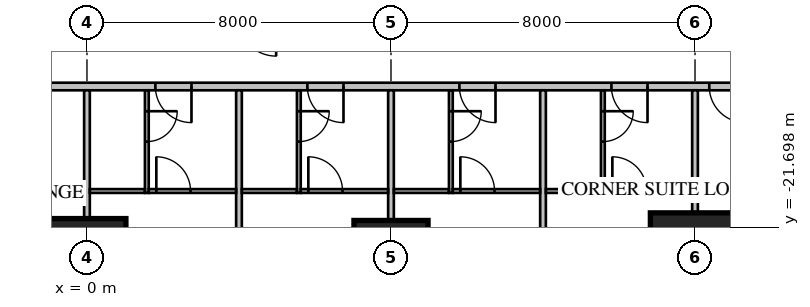
"""IFC4 building model, lengths in metres.
Left out: names, types, materials, properties, quantities, classifications, styles, units other than length and angle.
Written with IfcOpenShell. Run it as: python <this file> out.ifc"""

import sys

from ifc_helpers import new_model, si_unit, direction, frame, frame_2d, origin, origin_2d, place, context, subcontext, project, spatial, rectangle, extrude, element, fill, save


model = new_model("IFC4")
c1 = context("Model", 3, precision=1e-05, world=origin(), true_north=direction((0.0, 1.0)))
c2 = subcontext(c1, "Body", "Model", "MODEL_VIEW")
j1 = project(units=[si_unit("LENGTHUNIT", "METRE"), si_unit("PLANEANGLEUNIT", "RADIAN")], contexts=[c1])
p1 = place(None, origin())
s1 = spatial("IfcSite", under=j1, at=p1, CompositionType="ELEMENT")
p2 = place(p1, origin())
s2 = spatial("IfcBuilding", under=s1, at=p2, CompositionType="ELEMENT")
p3 = place(p2, frame((0.0, 0.0, 23.7)))
s3 = spatial("IfcBuildingStorey", under=s2, at=p3, CompositionType="ELEMENT", Elevation=23.7)
p4 = place(p3, frame((0.0, -22.5, 0.0), z_axis=(0.0, 0.0, 1.0), x_axis=(1.0, 0.0, 0.0)))
e1 = element("IfcColumn", 1, at=p4, inside=s3, PredefinedType="COLUMN", context=c2, shape_type="SweptSolid", body=[
    extrude(rectangle(XDim=2.05, YDim=2.05, at=origin_2d()), origin(), (0.0, 0.0, 1.0), 3.85),
])
p5 = place(p3, frame((8.0, -22.5, 0.0), z_axis=(0.0, 0.0, 1.0), x_axis=(1.0, 0.0, 0.0)))
e2 = element("IfcColumn", 2, at=p5, inside=s3, PredefinedType="COLUMN", context=c2, shape_type="SweptSolid", body=[
    extrude(rectangle(XDim=1.95, YDim=1.95, at=origin_2d()), origin(), (0.0, 0.0, 1.0), 3.85),
])
p6 = place(p3, frame((16.0, -22.5, 0.0), z_axis=(0.0, 0.0, 1.0), x_axis=(1.0, 0.0, 0.0)))
e3 = element("IfcColumn", 3, at=p6, inside=s3, PredefinedType="COLUMN", context=c2, shape_type="SweptSolid", body=[
    extrude(rectangle(XDim=2.35, YDim=2.35, at=origin_2d()), origin(), (0.0, 0.0, 1.0), 3.85),
])
p7 = place(p3, frame((-18.0, -18.0, 0.0), z_axis=(0.0, 0.0, 1.0), x_axis=(1.0, 0.0, 0.0)))
e4 = element("IfcWall", 4, at=p7, inside=s3, PredefinedType="PARTITIONING", context=c2, shape_type="SweptSolid", body=[
    extrude(rectangle(XDim=36.0, YDim=0.2, at=frame_2d((18.0, 0.0))), origin(), (0.0, 0.0, 1.0), 3.65),
])
p8 = place(p7, frame((0.375, 0.0, 0.0)))
e5 = element("IfcOpeningElement", 5, at=p8, cuts=e4, PredefinedType="OPENING", context=c2, shape_type="SweptSolid", body=[
    extrude(rectangle(XDim=1.0, YDim=2.1, at=frame_2d((0.5, 1.05))), frame((0.0, 0.12, 0.0), z_axis=(0.0, -1.0, 0.0), x_axis=(1.0, 0.0, 0.0)), (0.0, 0.0, 1.0), 0.24),
])
p9 = place(p7, frame((2.45, 0.0, 0.0)))
e6 = element("IfcOpeningElement", 6, at=p9, cuts=e4, PredefinedType="OPENING", context=c2, shape_type="SweptSolid", body=[
    extrude(rectangle(XDim=0.8, YDim=2.1, at=frame_2d((0.4, 1.05))), frame((0.0, 0.12, 0.0), z_axis=(0.0, -1.0, 0.0), x_axis=(1.0, 0.0, 0.0)), (0.0, 0.0, 1.0), 0.24),
])
p10 = place(p7, frame((4.05, 0.0, 0.0)))
e7 = element("IfcOpeningElement", 7, at=p10, cuts=e4, PredefinedType="OPENING", context=c2, shape_type="SweptSolid", body=[
    extrude(rectangle(XDim=1.0, YDim=2.1, at=frame_2d((0.5, 1.05))), frame((0.0, 0.12, 0.0), z_axis=(0.0, -1.0, 0.0), x_axis=(1.0, 0.0, 0.0)), (0.0, 0.0, 1.0), 0.24),
])
p11 = place(p7, frame((6.45, 0.0, 0.0)))
e8 = element("IfcOpeningElement", 8, at=p11, cuts=e4, PredefinedType="OPENING", context=c2, shape_type="SweptSolid", body=[
    extrude(rectangle(XDim=0.9, YDim=2.1, at=frame_2d((0.45, 1.05))), frame((0.0, 0.12, 0.0), z_axis=(0.0, -1.0, 0.0), x_axis=(1.0, 0.0, 0.0)), (0.0, 0.0, 1.0), 0.24),
])
p12 = place(p7, frame((8.15, 0.0, 0.0)))
e9 = element("IfcOpeningElement", 9, at=p12, cuts=e4, PredefinedType="OPENING", context=c2, shape_type="SweptSolid", body=[
    extrude(rectangle(XDim=1.0, YDim=2.1, at=frame_2d((0.5, 1.05))), frame((0.0, 0.12, 0.0), z_axis=(0.0, -1.0, 0.0), x_axis=(1.0, 0.0, 0.0)), (0.0, 0.0, 1.0), 0.24),
])
p13 = place(p7, frame((19.8, 0.0, 0.0)))
e10 = element("IfcOpeningElement", 10, at=p13, cuts=e4, PredefinedType="OPENING", context=c2, shape_type="SweptSolid", body=[
    extrude(rectangle(XDim=0.95, YDim=2.1, at=frame_2d((0.475, 1.05))), frame((0.0, 0.12, 0.0), z_axis=(0.0, -1.0, 0.0), x_axis=(1.0, 0.0, 0.0)), (0.0, 0.0, 1.0), 0.24),
])
p14 = place(p7, frame((23.8, 0.0, 0.0)))
e11 = element("IfcOpeningElement", 11, at=p14, cuts=e4, PredefinedType="OPENING", context=c2, shape_type="SweptSolid", body=[
    extrude(rectangle(XDim=0.95, YDim=2.1, at=frame_2d((0.475, 1.05))), frame((0.0, 0.12, 0.0), z_axis=(0.0, -1.0, 0.0), x_axis=(1.0, 0.0, 0.0)), (0.0, 0.0, 1.0), 0.24),
])
p15 = place(p7, frame((27.8, 0.0, 0.0)))
e12 = element("IfcOpeningElement", 12, at=p15, cuts=e4, PredefinedType="OPENING", context=c2, shape_type="SweptSolid", body=[
    extrude(rectangle(XDim=0.95, YDim=2.1, at=frame_2d((0.475, 1.05))), frame((0.0, 0.12, 0.0), z_axis=(0.0, -1.0, 0.0), x_axis=(1.0, 0.0, 0.0)), (0.0, 0.0, 1.0), 0.24),
])
p16 = place(p7, frame((31.8, 0.0, 0.0)))
e13 = element("IfcOpeningElement", 13, at=p16, cuts=e4, PredefinedType="OPENING", context=c2, shape_type="SweptSolid", body=[
    extrude(rectangle(XDim=0.95, YDim=2.1, at=frame_2d((0.475, 1.05))), frame((0.0, 0.12, 0.0), z_axis=(0.0, -1.0, 0.0), x_axis=(1.0, 0.0, 0.0)), (0.0, 0.0, 1.0), 0.24),
])
p17 = place(p7, frame((34.375, 0.0, 0.0)))
e14 = element("IfcOpeningElement", 14, at=p17, cuts=e4, PredefinedType="OPENING", context=c2, shape_type="SweptSolid", body=[
    extrude(rectangle(XDim=0.95, YDim=2.1, at=frame_2d((0.475, 1.05))), frame((0.0, 0.12, 0.0), z_axis=(0.0, -1.0, 0.0), x_axis=(1.0, 0.0, 0.0)), (0.0, 0.0, 1.0), 0.24),
])
p18 = place(p7, frame((11.2, 0.0, 0.0)))
e15 = element("IfcOpeningElement", 15, at=p18, cuts=e4, PredefinedType="OPENING", context=c2, shape_type="SweptSolid", body=[
    extrude(rectangle(XDim=1.0, YDim=2.1, at=frame_2d((0.5, 1.05))), frame((0.0, 0.12, 0.0), z_axis=(0.0, -1.0, 0.0), x_axis=(1.0, 0.0, 0.0)), (0.0, 0.0, 1.0), 0.24),
])
p19 = place(p3, frame((0.0, -18.1, 0.0), z_axis=(0.0, 0.0, 1.0), x_axis=(0.0, -1.0, 0.0)))
e16 = element("IfcWall", 16, at=p19, inside=s3, PredefinedType="PARTITIONING", context=c2, shape_type="SweptSolid", body=[
    extrude(rectangle(XDim=6.6, YDim=0.15, at=frame_2d((3.3, 0.0))), origin(), (0.0, 0.0, 1.0), 2.809),
])
for number, where, z_axis, x_axis in (
    (17, (4.0, -18.1, 0.0), (0.0, 0.0, 1.0), (0.0, -1.0, 0.0)),
    (18, (8.0, -18.1, 0.0), (0.0, 0.0, 1.0), (0.0, -1.0, 0.0)),
    (19, (12.0, -18.1, 0.0), (0.0, 0.0, 1.0), (0.0, -1.0, 0.0)),
):
    element("IfcWall", number, at=place(p3, frame(where, z_axis=z_axis, x_axis=x_axis)), inside=s3, PredefinedType="PARTITIONING", context=c2, shape_type="SweptSolid", body=[
        extrude(rectangle(XDim=6.6, YDim=0.15, at=frame_2d((3.3, 0.0))), origin(), (0.0, 0.0, 1.0), 3.65),
    ])
p20 = place(p3, frame((16.0, -18.1, 0.0), z_axis=(0.0, 0.0, 1.0), x_axis=(0.0, -1.0, 0.0)))
e20 = element("IfcWall", 20, at=p20, inside=s3, PredefinedType="PARTITIONING", context=c2, shape_type="SweptSolid", body=[
    extrude(rectangle(XDim=6.589, YDim=0.15, at=frame_2d((3.295, 0.0))), origin(), (0.0, 0.0, 1.0), 3.65),
])
p21 = place(p3, frame((1.575, -18.1, 0.0), z_axis=(0.0, 0.0, 1.0), x_axis=(0.0, -1.0, 0.0)))
e21 = element("IfcWall", 21, at=p21, inside=s3, PredefinedType="PARTITIONING", context=c2, shape_type="SweptSolid", body=[
    extrude(rectangle(XDim=2.7, YDim=0.1, at=frame_2d((1.35, 0.0))), origin(), (0.0, 0.0, 1.0), 3.65),
])
p22 = place(p21, frame((0.55, 0.0, 0.0)))
e22 = element("IfcOpeningElement", 22, at=p22, cuts=e21, PredefinedType="OPENING", context=c2, shape_type="SweptSolid", body=[
    extrude(rectangle(XDim=0.8, YDim=2.1, at=frame_2d((0.4, 1.05))), frame((0.0, 0.07, 0.0), z_axis=(0.0, -1.0, 0.0), x_axis=(1.0, 0.0, 0.0)), (0.0, 0.0, 1.0), 0.14),
])
p23 = place(p3, frame((0.075, -20.75, 0.0), z_axis=(0.0, 0.0, 1.0), x_axis=(1.0, 0.0, 0.0)))
e23 = element("IfcWall", 23, at=p23, inside=s3, PredefinedType="PARTITIONING", context=c2, shape_type="SweptSolid", body=[
    extrude(rectangle(XDim=1.45, YDim=0.1, at=frame_2d((0.725, 0.0))), origin(), (0.0, 0.0, 1.0), 3.65),
])
p24 = place(p3, frame((5.575, -18.1, 0.0), z_axis=(0.0, 0.0, 1.0), x_axis=(0.0, -1.0, 0.0)))
e24 = element("IfcWall", 24, at=p24, inside=s3, PredefinedType="PARTITIONING", context=c2, shape_type="SweptSolid", body=[
    extrude(rectangle(XDim=2.7, YDim=0.1, at=frame_2d((1.35, 0.0))), origin(), (0.0, 0.0, 1.0), 3.65),
])
p25 = place(p24, frame((0.55, 0.0, 0.0)))
e25 = element("IfcOpeningElement", 25, at=p25, cuts=e24, PredefinedType="OPENING", context=c2, shape_type="SweptSolid", body=[
    extrude(rectangle(XDim=0.8, YDim=2.1, at=frame_2d((0.4, 1.05))), frame((0.0, 0.07, 0.0), z_axis=(0.0, -1.0, 0.0), x_axis=(1.0, 0.0, 0.0)), (0.0, 0.0, 1.0), 0.14),
])
p26 = place(p3, frame((4.075, -20.75, 0.0), z_axis=(0.0, 0.0, 1.0), x_axis=(1.0, 0.0, 0.0)))
e26 = element("IfcWall", 26, at=p26, inside=s3, PredefinedType="PARTITIONING", context=c2, shape_type="SweptSolid", body=[
    extrude(rectangle(XDim=1.45, YDim=0.1, at=frame_2d((0.725, 0.0))), origin(), (0.0, 0.0, 1.0), 3.65),
])
p27 = place(p3, frame((9.575, -18.1, 0.0), z_axis=(0.0, 0.0, 1.0), x_axis=(0.0, -1.0, 0.0)))
e27 = element("IfcWall", 27, at=p27, inside=s3, PredefinedType="PARTITIONING", context=c2, shape_type="SweptSolid", body=[
    extrude(rectangle(XDim=2.7, YDim=0.1, at=frame_2d((1.35, 0.0))), origin(), (0.0, 0.0, 1.0), 3.65),
])
p28 = place(p27, frame((0.55, 0.0, 0.0)))
e28 = element("IfcOpeningElement", 28, at=p28, cuts=e27, PredefinedType="OPENING", context=c2, shape_type="SweptSolid", body=[
    extrude(rectangle(XDim=0.8, YDim=2.1, at=frame_2d((0.4, 1.05))), frame((0.0, 0.07, 0.0), z_axis=(0.0, -1.0, 0.0), x_axis=(1.0, 0.0, 0.0)), (0.0, 0.0, 1.0), 0.14),
])
p29 = place(p3, frame((8.075, -20.75, 0.0), z_axis=(0.0, 0.0, 1.0), x_axis=(1.0, 0.0, 0.0)))
e29 = element("IfcWall", 29, at=p29, inside=s3, PredefinedType="PARTITIONING", context=c2, shape_type="SweptSolid", body=[
    extrude(rectangle(XDim=1.45, YDim=0.1, at=frame_2d((0.725, 0.0))), origin(), (0.0, 0.0, 1.0), 3.65),
])
p30 = place(p3, frame((13.575, -18.1, 0.0), z_axis=(0.0, 0.0, 1.0), x_axis=(0.0, -1.0, 0.0)))
e30 = element("IfcWall", 30, at=p30, inside=s3, PredefinedType="PARTITIONING", context=c2, shape_type="SweptSolid", body=[
    extrude(rectangle(XDim=2.7, YDim=0.1, at=frame_2d((1.35, 0.0))), origin(), (0.0, 0.0, 1.0), 3.65),
])
p31 = place(p30, frame((0.55, 0.0, 0.0)))
e31 = element("IfcOpeningElement", 31, at=p31, cuts=e30, PredefinedType="OPENING", context=c2, shape_type="SweptSolid", body=[
    extrude(rectangle(XDim=0.8, YDim=2.1, at=frame_2d((0.4, 1.05))), frame((0.0, 0.07, 0.0), z_axis=(0.0, -1.0, 0.0), x_axis=(1.0, 0.0, 0.0)), (0.0, 0.0, 1.0), 0.14),
])
p32 = place(p3, frame((12.075, -20.75, 0.0), z_axis=(0.0, 0.0, 1.0), x_axis=(1.0, 0.0, 0.0)))
e32 = element("IfcWall", 32, at=p32, inside=s3, PredefinedType="PARTITIONING", context=c2, shape_type="SweptSolid", body=[
    extrude(rectangle(XDim=1.45, YDim=0.1, at=frame_2d((0.725, 0.0))), origin(), (0.0, 0.0, 1.0), 3.65),
])
p33 = place(p3, frame((1.625, -20.75, 0.0), z_axis=(0.0, 0.0, 1.0), x_axis=(1.0, 0.0, 0.0)))
e33 = element("IfcWall", 33, at=p33, inside=s3, PredefinedType="PARTITIONING", context=c2, shape_type="SweptSolid", body=[
    extrude(rectangle(XDim=2.3, YDim=0.1, at=frame_2d((1.15, 0.0))), origin(), (0.0, 0.0, 1.0), 3.65),
])
p34 = place(p33, frame((0.2, 0.0, 0.0)))
e34 = element("IfcOpeningElement", 34, at=p34, cuts=e33, PredefinedType="OPENING", context=c2, shape_type="SweptSolid", body=[
    extrude(rectangle(XDim=0.9, YDim=2.1, at=frame_2d((0.45, 1.05))), frame((0.0, 0.07, 0.0), z_axis=(0.0, -1.0, 0.0), x_axis=(1.0, 0.0, 0.0)), (0.0, 0.0, 1.0), 0.14),
])
p35 = place(p3, frame((5.625, -20.75, 0.0), z_axis=(0.0, 0.0, 1.0), x_axis=(1.0, 0.0, 0.0)))
e35 = element("IfcWall", 35, at=p35, inside=s3, PredefinedType="PARTITIONING", context=c2, shape_type="SweptSolid", body=[
    extrude(rectangle(XDim=2.3, YDim=0.1, at=frame_2d((1.15, 0.0))), origin(), (0.0, 0.0, 1.0), 3.65),
])
p36 = place(p35, frame((0.2, 0.0, 0.0)))
e36 = element("IfcOpeningElement", 36, at=p36, cuts=e35, PredefinedType="OPENING", context=c2, shape_type="SweptSolid", body=[
    extrude(rectangle(XDim=0.9, YDim=2.1, at=frame_2d((0.45, 1.05))), frame((0.0, 0.07, 0.0), z_axis=(0.0, -1.0, 0.0), x_axis=(1.0, 0.0, 0.0)), (0.0, 0.0, 1.0), 0.14),
])
p37 = place(p3, frame((9.625, -20.75, 0.0), z_axis=(0.0, 0.0, 1.0), x_axis=(1.0, 0.0, 0.0)))
e37 = element("IfcWall", 37, at=p37, inside=s3, PredefinedType="PARTITIONING", context=c2, shape_type="SweptSolid", body=[
    extrude(rectangle(XDim=2.3, YDim=0.1, at=frame_2d((1.15, 0.0))), origin(), (0.0, 0.0, 1.0), 3.65),
])
p38 = place(p37, frame((0.2, 0.0, 0.0)))
e38 = element("IfcOpeningElement", 38, at=p38, cuts=e37, PredefinedType="OPENING", context=c2, shape_type="SweptSolid", body=[
    extrude(rectangle(XDim=0.9, YDim=2.1, at=frame_2d((0.45, 1.05))), frame((0.0, 0.07, 0.0), z_axis=(0.0, -1.0, 0.0), x_axis=(1.0, 0.0, 0.0)), (0.0, 0.0, 1.0), 0.14),
])
p39 = place(p3, frame((13.625, -20.75, 0.0), z_axis=(0.0, 0.0, 1.0), x_axis=(1.0, 0.0, 0.0)))
e39 = element("IfcWall", 39, at=p39, inside=s3, PredefinedType="PARTITIONING", context=c2, shape_type="SweptSolid", body=[
    extrude(rectangle(XDim=2.3, YDim=0.1, at=frame_2d((1.15, 0.0))), origin(), (0.0, 0.0, 1.0), 3.65),
])
p40 = place(p39, frame((0.2, 0.0, 0.0)))
e40 = element("IfcOpeningElement", 40, at=p40, cuts=e39, PredefinedType="OPENING", context=c2, shape_type="SweptSolid", body=[
    extrude(rectangle(XDim=0.9, YDim=2.1, at=frame_2d((0.45, 1.05))), frame((0.0, 0.07, 0.0), z_axis=(0.0, -1.0, 0.0), x_axis=(1.0, 0.0, 0.0)), (0.0, 0.0, 1.0), 0.14),
])
p41 = place(p13, origin())
e41 = element("IfcDoor", 41, at=p41, inside=s3, OperationType="SINGLE_SWING_RIGHT", PredefinedType="DOOR", context=c2, shape_type="SweptSolid", body=[
    extrude(rectangle(XDim=0.95, YDim=2.1, at=frame_2d((0.475, 1.05))), frame((0.0, 0.025, 0.0), z_axis=(0.0, -1.0, 0.0), x_axis=(1.0, 0.0, 0.0)), (0.0, 0.0, 1.0), 0.05),
])
fill(e10, e41)
p42 = place(p22, origin())
e42 = element("IfcDoor", 42, at=p42, inside=s3, OperationType="SINGLE_SWING_LEFT", PredefinedType="DOOR", context=c2, shape_type="SweptSolid", body=[
    extrude(rectangle(XDim=0.8, YDim=2.1, at=frame_2d((0.4, 1.05))), frame((0.0, 0.025, 0.0), z_axis=(0.0, -1.0, 0.0), x_axis=(1.0, 0.0, 0.0)), (0.0, 0.0, 1.0), 0.05),
])
fill(e22, e42)
p43 = place(p14, origin())
e43 = element("IfcDoor", 43, at=p43, inside=s3, OperationType="SINGLE_SWING_RIGHT", PredefinedType="DOOR", context=c2, shape_type="SweptSolid", body=[
    extrude(rectangle(XDim=0.95, YDim=2.1, at=frame_2d((0.475, 1.05))), frame((0.0, 0.025, 0.0), z_axis=(0.0, -1.0, 0.0), x_axis=(1.0, 0.0, 0.0)), (0.0, 0.0, 1.0), 0.05),
])
fill(e11, e43)
p44 = place(p25, origin())
e44 = element("IfcDoor", 44, at=p44, inside=s3, OperationType="SINGLE_SWING_LEFT", PredefinedType="DOOR", context=c2, shape_type="SweptSolid", body=[
    extrude(rectangle(XDim=0.8, YDim=2.1, at=frame_2d((0.4, 1.05))), frame((0.0, 0.025, 0.0), z_axis=(0.0, -1.0, 0.0), x_axis=(1.0, 0.0, 0.0)), (0.0, 0.0, 1.0), 0.05),
])
fill(e25, e44)
p45 = place(p15, origin())
e45 = element("IfcDoor", 45, at=p45, inside=s3, OperationType="SINGLE_SWING_RIGHT", PredefinedType="DOOR", context=c2, shape_type="SweptSolid", body=[
    extrude(rectangle(XDim=0.95, YDim=2.1, at=frame_2d((0.475, 1.05))), frame((0.0, 0.025, 0.0), z_axis=(0.0, -1.0, 0.0), x_axis=(1.0, 0.0, 0.0)), (0.0, 0.0, 1.0), 0.05),
])
fill(e12, e45)
p46 = place(p28, origin())
e46 = element("IfcDoor", 46, at=p46, inside=s3, OperationType="SINGLE_SWING_LEFT", PredefinedType="DOOR", context=c2, shape_type="SweptSolid", body=[
    extrude(rectangle(XDim=0.8, YDim=2.1, at=frame_2d((0.4, 1.05))), frame((0.0, 0.025, 0.0), z_axis=(0.0, -1.0, 0.0), x_axis=(1.0, 0.0, 0.0)), (0.0, 0.0, 1.0), 0.05),
])
fill(e28, e46)
p47 = place(p16, origin())
e47 = element("IfcDoor", 47, at=p47, inside=s3, OperationType="SINGLE_SWING_RIGHT", PredefinedType="DOOR", context=c2, shape_type="SweptSolid", body=[
    extrude(rectangle(XDim=0.95, YDim=2.1, at=frame_2d((0.475, 1.05))), frame((0.0, 0.025, 0.0), z_axis=(0.0, -1.0, 0.0), x_axis=(1.0, 0.0, 0.0)), (0.0, 0.0, 1.0), 0.05),
])
fill(e13, e47)
p48 = place(p31, origin())
e48 = element("IfcDoor", 48, at=p48, inside=s3, OperationType="SINGLE_SWING_LEFT", PredefinedType="DOOR", context=c2, shape_type="SweptSolid", body=[
    extrude(rectangle(XDim=0.8, YDim=2.1, at=frame_2d((0.4, 1.05))), frame((0.0, 0.025, 0.0), z_axis=(0.0, -1.0, 0.0), x_axis=(1.0, 0.0, 0.0)), (0.0, 0.0, 1.0), 0.05),
])
fill(e31, e48)
p49 = place(p17, origin())
e49 = element("IfcDoor", 49, at=p49, inside=s3, OperationType="SINGLE_SWING_RIGHT", PredefinedType="DOOR", context=c2, shape_type="SweptSolid", body=[
    extrude(rectangle(XDim=0.95, YDim=2.1, at=frame_2d((0.475, 1.05))), frame((0.0, 0.025, 0.0), z_axis=(0.0, -1.0, 0.0), x_axis=(1.0, 0.0, 0.0)), (0.0, 0.0, 1.0), 0.05),
])
fill(e14, e49)
p50 = place(p34, origin())
e50 = element("IfcDoor", 50, at=p50, inside=s3, OperationType="SINGLE_SWING_LEFT", PredefinedType="DOOR", context=c2, shape_type="SweptSolid", body=[
    extrude(rectangle(XDim=0.9, YDim=2.1, at=frame_2d((0.45, 1.05))), frame((0.0, 0.025, 0.0), z_axis=(0.0, -1.0, 0.0), x_axis=(1.0, 0.0, 0.0)), (0.0, 0.0, 1.0), 0.05),
])
fill(e34, e50)
p51 = place(p36, origin())
e51 = element("IfcDoor", 51, at=p51, inside=s3, OperationType="SINGLE_SWING_LEFT", PredefinedType="DOOR", context=c2, shape_type="SweptSolid", body=[
    extrude(rectangle(XDim=0.9, YDim=2.1, at=frame_2d((0.45, 1.05))), frame((0.0, 0.025, 0.0), z_axis=(0.0, -1.0, 0.0), x_axis=(1.0, 0.0, 0.0)), (0.0, 0.0, 1.0), 0.05),
])
fill(e36, e51)
p52 = place(p38, origin())
e52 = element("IfcDoor", 52, at=p52, inside=s3, OperationType="SINGLE_SWING_LEFT", PredefinedType="DOOR", context=c2, shape_type="SweptSolid", body=[
    extrude(rectangle(XDim=0.9, YDim=2.1, at=frame_2d((0.45, 1.05))), frame((0.0, 0.025, 0.0), z_axis=(0.0, -1.0, 0.0), x_axis=(1.0, 0.0, 0.0)), (0.0, 0.0, 1.0), 0.05),
])
fill(e38, e52)
p53 = place(p40, origin())
e53 = element("IfcDoor", 53, at=p53, inside=s3, OperationType="SINGLE_SWING_LEFT", PredefinedType="DOOR", context=c2, shape_type="SweptSolid", body=[
    extrude(rectangle(XDim=0.9, YDim=2.1, at=frame_2d((0.45, 1.05))), frame((0.0, 0.025, 0.0), z_axis=(0.0, -1.0, 0.0), x_axis=(1.0, 0.0, 0.0)), (0.0, 0.0, 1.0), 0.05),
])
fill(e40, e53)
save(model, sys.argv[1])
